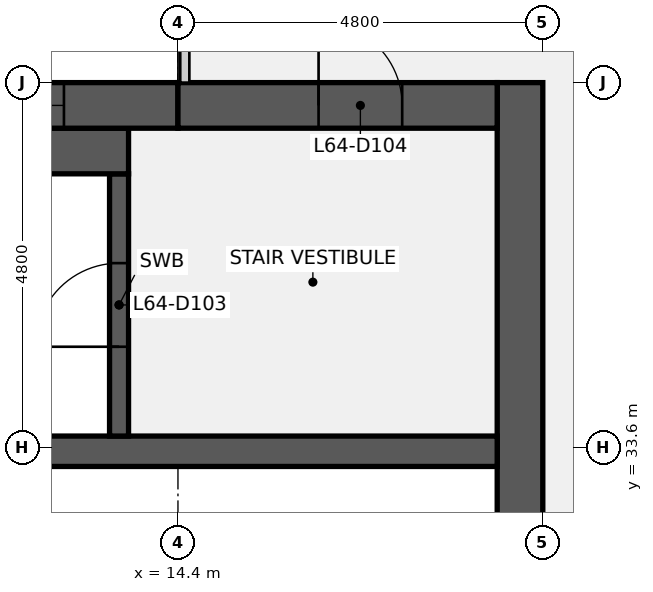
"""IFC4 building model, lengths in metres.
Left out: names, types, materials, properties, quantities, classifications, styles, units other than length and angle.
Written with IfcOpenShell. Run it as: python <this file> out.ifc"""

import sys

from ifc_helpers import new_model, si_unit, direction, frame, frame_2d, origin, place, context, subcontext, project, spatial, rectangle, extrude, element, fill, save


model = new_model("IFC4")
c1 = context("Model", 3, precision=1e-05, world=origin(), true_north=direction((0.0, 1.0)))
c2 = subcontext(c1, "Body", "Model", "MODEL_VIEW")
j1 = project(units=[si_unit("LENGTHUNIT", "METRE"), si_unit("PLANEANGLEUNIT", "RADIAN")], contexts=[c1])
p1 = place(None, origin())
s1 = spatial("IfcSite", under=j1, at=p1, CompositionType="ELEMENT")
p2 = place(p1, origin())
s2 = spatial("IfcBuilding", under=s1, at=p2, CompositionType="ELEMENT")
p3 = place(p2, frame((0.0, 0.0, 294.3)))
s3 = spatial("IfcBuildingStorey", under=s2, at=p3, CompositionType="ELEMENT", Elevation=294.3)
p4 = place(p3, frame((18.9, 38.4, 0.0), z_axis=(0.0, 0.0, 1.0), x_axis=(0.0, -1.0, 0.0)))
e1 = element("IfcWall", 1, at=p4, inside=s3, PredefinedType="SHEAR", context=c2, shape_type="SweptSolid", body=[
    extrude(rectangle(XDim=28.8, YDim=0.6, at=frame_2d((14.4, 0.0))), origin(), (0.0, 0.0, 1.0), 3.84),
])
p5 = place(p4, frame((18.3, 0.0, 0.0)))
e2 = element("IfcOpeningElement", 2, at=p5, cuts=e1, PredefinedType="OPENING", context=c2, shape_type="SweptSolid", body=[
    extrude(rectangle(XDim=1.8, YDim=2.1, at=frame_2d((0.9, 1.05))), frame((0.0, 0.31, 0.0), z_axis=(0.0, -1.0, 0.0), x_axis=(1.0, 0.0, 0.0)), (0.0, 0.0, 1.0), 0.62),
])
p6 = place(p4, frame((8.7, 0.0, 0.0)))
e3 = element("IfcOpeningElement", 3, at=p6, cuts=e1, PredefinedType="OPENING", context=c2, shape_type="SweptSolid", body=[
    extrude(rectangle(XDim=1.8, YDim=2.1, at=frame_2d((0.9, 1.05))), frame((0.0, 0.31, 0.0), z_axis=(0.0, -1.0, 0.0), x_axis=(1.0, 0.0, 0.0)), (0.0, 0.0, 1.0), 0.62),
])
p7 = place(p3, frame((0.6, 33.55, 0.0), z_axis=(0.0, 0.0, 1.0), x_axis=(1.0, 0.0, 0.0)))
e4 = element("IfcWall", 4, at=p7, inside=s3, PredefinedType="SHEAR", context=c2, shape_type="SweptSolid", body=[
    extrude(rectangle(XDim=18.0, YDim=0.4, at=frame_2d((9.0, 0.0))), origin(), (0.0, 0.0, 1.0), 3.84),
])
p8 = place(p3, frame((13.625, 33.75, 0.0), z_axis=(0.0, 0.0, 1.0), x_axis=(0.0, 1.0, 0.0)))
e5 = element("IfcWall", 5, at=p8, inside=s3, PredefinedType="SHEAR", context=c2, shape_type="SweptSolid", body=[
    extrude(rectangle(XDim=3.45, YDim=0.25, at=frame_2d((1.725, 0.0))), origin(), (0.0, 0.0, 1.0), 3.84),
])
p9 = place(p8, frame((1.175, 0.0, 0.0)))
e6 = element("IfcOpeningElement", 6, at=p9, cuts=e5, PredefinedType="OPENING", context=c2, shape_type="SweptSolid", body=[
    extrude(rectangle(XDim=1.1, YDim=2.1, at=frame_2d((0.55, 1.05))), frame((0.0, 0.135, 0.0), z_axis=(0.0, -1.0, 0.0), x_axis=(1.0, 0.0, 0.0)), (0.0, 0.0, 1.0), 0.27),
])
p10 = place(p3, frame((6.25, 37.5, 0.0), z_axis=(0.0, 0.0, 1.0), x_axis=(1.0, 0.0, 0.0)))
e7 = element("IfcWall", 7, at=p10, inside=s3, PredefinedType="SHEAR", context=c2, shape_type="SweptSolid", body=[
    extrude(rectangle(XDim=7.5, YDim=0.6, at=frame_2d((3.75, 0.0))), origin(), (0.0, 0.0, 1.0), 3.84),
])
p11 = place(p3, frame((0.6, 38.1, 0.0), z_axis=(0.0, 0.0, 1.0), x_axis=(1.0, 0.0, 0.0)))
e8 = element("IfcWall", 8, at=p11, inside=s3, PredefinedType="SHEAR", context=c2, shape_type="SweptSolid", body=[
    extrude(rectangle(XDim=13.8, YDim=0.6, at=frame_2d((6.9, 0.0))), origin(), (0.0, 0.0, 1.0), 3.84),
])
p12 = place(p11, frame((5.7, 0.0, 0.9)))
e9 = element("IfcOpeningElement", 9, at=p12, cuts=e8, PredefinedType="OPENING", context=c2, shape_type="SweptSolid", body=[
    extrude(rectangle(XDim=1.8, YDim=1.5, at=frame_2d((0.9, 0.75))), frame((0.0, 0.31, 0.0), z_axis=(0.0, -1.0, 0.0), x_axis=(1.0, 0.0, 0.0)), (0.0, 0.0, 1.0), 0.62),
])
p13 = place(p11, frame((10.5, 0.0, 0.9)))
e10 = element("IfcOpeningElement", 10, at=p13, cuts=e8, PredefinedType="OPENING", context=c2, shape_type="SweptSolid", body=[
    extrude(rectangle(XDim=1.8, YDim=1.5, at=frame_2d((0.9, 0.75))), frame((0.0, 0.31, 0.0), z_axis=(0.0, -1.0, 0.0), x_axis=(1.0, 0.0, 0.0)), (0.0, 0.0, 1.0), 0.62),
])
p14 = place(p3, frame((14.4, 38.1, 0.0), z_axis=(0.0, 0.0, 1.0), x_axis=(1.0, 0.0, 0.0)))
e11 = element("IfcWall", 11, at=p14, inside=s3, PredefinedType="SHEAR", context=c2, shape_type="SweptSolid", body=[
    extrude(rectangle(XDim=4.2, YDim=0.6, at=frame_2d((2.1, 0.0))), origin(), (0.0, 0.0, 1.0), 3.84),
])
p15 = place(p14, frame((1.85, 0.0, 0.0)))
e12 = element("IfcOpeningElement", 12, at=p15, cuts=e11, PredefinedType="OPENING", context=c2, shape_type="SweptSolid", body=[
    extrude(rectangle(XDim=1.1, YDim=2.1, at=frame_2d((0.55, 1.05))), frame((0.0, 0.31, 0.0), z_axis=(0.0, -1.0, 0.0), x_axis=(1.0, 0.0, 0.0)), (0.0, 0.0, 1.0), 0.62),
])
p16 = place(p9, origin())
e13 = element("IfcDoor", 13, at=p16, inside=s3, OperationType="SINGLE_SWING_LEFT", PredefinedType="DOOR", context=c2, shape_type="SweptSolid", body=[
    extrude(rectangle(XDim=1.1, YDim=2.1, at=frame_2d((0.55, 1.05))), frame((0.0, 0.025, 0.0), z_axis=(0.0, -1.0, 0.0), x_axis=(1.0, 0.0, 0.0)), (0.0, 0.0, 1.0), 0.05),
])
fill(e6, e13)
p17 = place(p15, origin())
e14 = element("IfcDoor", 14, at=p17, inside=s3, OperationType="SINGLE_SWING_LEFT", PredefinedType="DOOR", context=c2, shape_type="SweptSolid", body=[
    extrude(rectangle(XDim=1.1, YDim=2.1, at=frame_2d((0.55, 1.05))), frame((0.0, 0.025, 0.0), z_axis=(0.0, -1.0, 0.0), x_axis=(1.0, 0.0, 0.0)), (0.0, 0.0, 1.0), 0.05),
])
fill(e12, e14)
p18 = place(p13, origin())
e15 = element("IfcWindow", 15, at=p18, inside=s3, PartitioningType="SINGLE_PANEL", PredefinedType="WINDOW", context=c2, shape_type="SweptSolid", body=[
    extrude(rectangle(XDim=1.8, YDim=1.5, at=frame_2d((0.9, 0.75))), frame((0.0, 0.03, 0.0), z_axis=(0.0, -1.0, 0.0), x_axis=(1.0, 0.0, 0.0)), (0.0, 0.0, 1.0), 0.06),
])
fill(e10, e15)
save(model, sys.argv[1])
